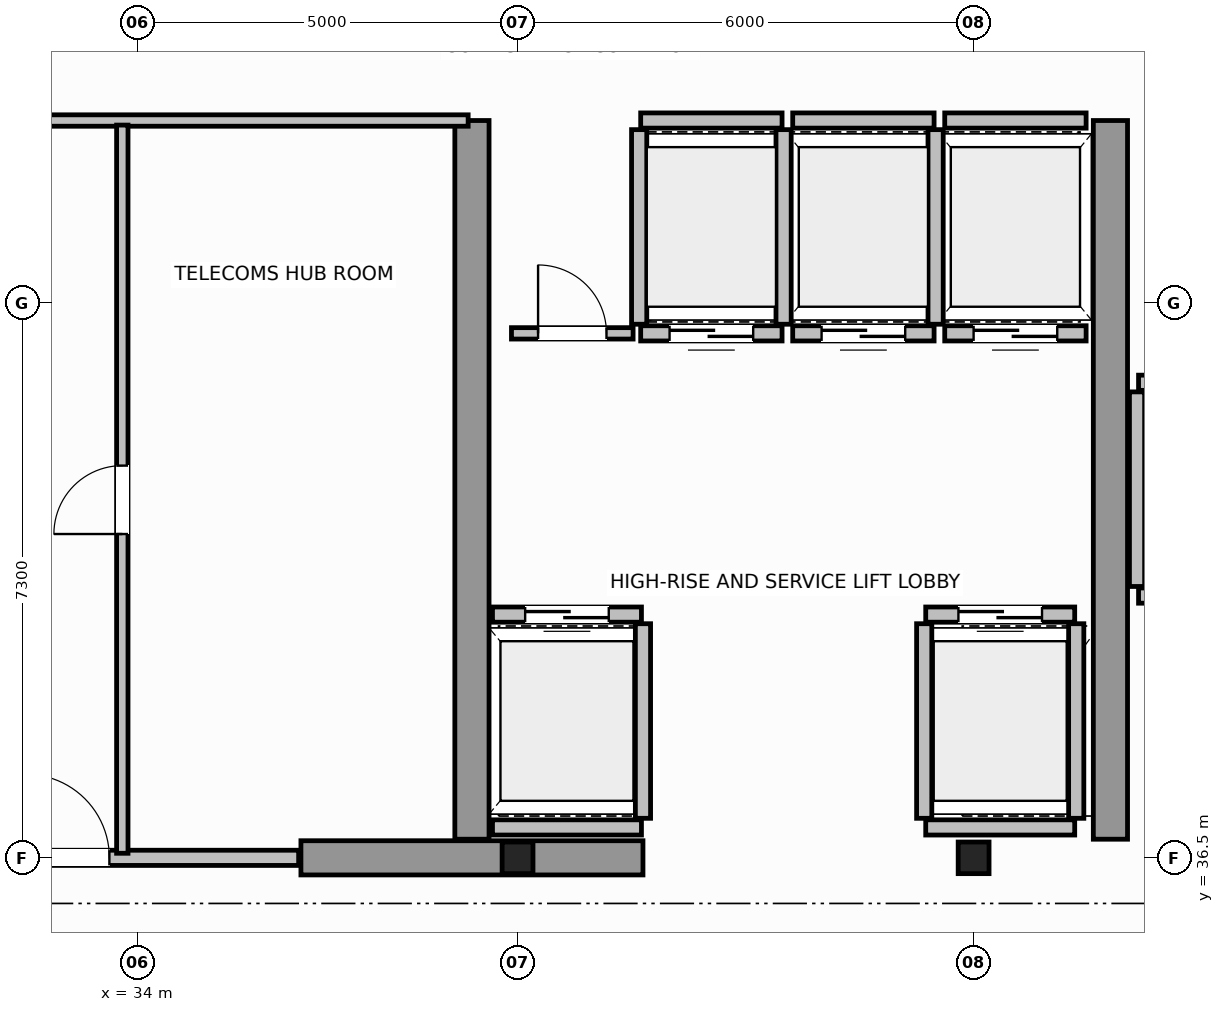
"""IFC4 building model, lengths in metres.
Left out: names, types, materials, properties, quantities, classifications, styles, units other than length and angle.
Written with IfcOpenShell. Run it as: python <this file> out.ifc"""

import sys

from ifc_helpers import new_model, si_unit, direction, frame, frame_2d, origin, origin_2d, place, context, subcontext, project, spatial, rectangle, i_section, extrude, source, transform, mapped, element, fill, save


model = new_model("IFC4")
c1 = context("Model", 3, precision=1e-05, world=origin(), true_north=direction((0.0, 1.0)))
c2 = subcontext(c1, "Body", "Model", "MODEL_VIEW")
j1 = project(units=[si_unit("LENGTHUNIT", "METRE"), si_unit("PLANEANGLEUNIT", "RADIAN")], contexts=[c1])
p1 = place(None, origin())
s1 = spatial("IfcSite", under=j1, at=p1, CompositionType="ELEMENT")
p2 = place(p1, origin())
s2 = spatial("IfcBuilding", under=s1, at=p2, CompositionType="ELEMENT")
p3 = place(p2, frame((0.0, 0.0, 272.6)))
s3 = spatial("IfcBuildingStorey", under=s2, at=p3, CompositionType="ELEMENT", Elevation=272.6)
m1 = source(origin(), c2, "Body", "SweptSolid", [
    extrude(i_section(OverallWidth=0.406, OverallDepth=0.416, WebThickness=0.03, FlangeThickness=0.042, FilletRadius=0.015, at=origin_2d()), origin(), (0.0, 0.0, 1.0), 3.8),
])
for number, where, z_axis, x_axis in (
    (1, (39.0, 36.5, 0.0), (0.0, 0.0, 1.0), (1.0, 0.0, 0.0)),
    (2, (45.0, 36.5, 0.0), (0.0, 0.0, 1.0), (1.0, 0.0, 0.0)),
):
    element("IfcColumn", number, at=place(p3, frame(where, z_axis=z_axis, x_axis=x_axis)), inside=s3, PredefinedType="COLUMN", context=c2, shape_type="MappedRepresentation", body=[
        mapped(m1, transform((0.0, 0.0, 0.0), scale=1.0)),
    ])
p4 = place(p3, frame((36.15, 36.5, 0.0), z_axis=(0.0, 0.0, 1.0), x_axis=(1.0, 0.0, 0.0)))
e3 = element("IfcWall", 3, at=p4, inside=s3, PredefinedType="SHEAR", context=c2, shape_type="SweptSolid", body=[
    extrude(rectangle(XDim=4.5, YDim=0.45, at=frame_2d((2.25, 0.0))), origin(), (0.0, 0.0, 1.0), 3.8),
])
for number, where, z_axis, x_axis in (
    (4, (38.4, 36.745, 0.0), (0.0, 0.0, 1.0), (0.0, 1.0, 0.0)),
    (5, (46.8, 36.745, 0.0), (0.0, 0.0, 1.0), (0.0, 1.0, 0.0)),
):
    element("IfcWall", number, at=place(p3, frame(where, z_axis=z_axis, x_axis=x_axis)), inside=s3, PredefinedType="SHEAR", context=c2, shape_type="SweptSolid", body=[
        extrude(rectangle(XDim=9.455, YDim=0.45, at=frame_2d((4.728, 0.0))), origin(), (0.0, 0.0, 1.0), 3.8),
    ])
p5 = place(p3, frame((38.67, 39.7, 0.0), z_axis=(0.0, 0.0, 1.0), x_axis=(1.0, 0.0, 0.0)))
e6 = element("IfcWall", 6, at=p5, inside=s3, PredefinedType="SOLIDWALL", context=c2, shape_type="SweptSolid", body=[
    extrude(rectangle(XDim=1.96, YDim=0.2, at=frame_2d((0.98, 0.0))), origin(), (0.0, 0.0, 1.0), 3.58),
])
p6 = place(p5, frame((0.43, 0.0, 0.0)))
e7 = element("IfcOpeningElement", 7, at=p6, cuts=e6, PredefinedType="OPENING", context=c2, shape_type="SweptSolid", body=[
    extrude(rectangle(XDim=1.1, YDim=2.15, at=frame_2d((0.55, 1.075))), frame((0.0, 0.11, 0.0), z_axis=(0.0, -1.0, 0.0), x_axis=(1.0, 0.0, 0.0)), (0.0, 0.0, 1.0), 0.22),
])
p7 = place(p3, frame((38.67, 36.9, 0.0), z_axis=(0.0, 0.0, 1.0), x_axis=(1.0, 0.0, 0.0)))
e8 = element("IfcWall", 8, at=p7, inside=s3, PredefinedType="SOLIDWALL", context=c2, shape_type="SweptSolid", body=[
    extrude(rectangle(XDim=1.96, YDim=0.2, at=frame_2d((0.98, 0.0))), origin(), (0.0, 0.0, 1.0), 3.58),
])
p8 = place(p3, frame((40.65, 37.02, 0.0), z_axis=(0.0, 0.0, 1.0), x_axis=(0.0, 1.0, 0.0)))
e9 = element("IfcWall", 9, at=p8, inside=s3, PredefinedType="SOLIDWALL", context=c2, shape_type="SweptSolid", body=[
    extrude(rectangle(XDim=2.56, YDim=0.2, at=frame_2d((1.28, 0.0))), origin(), (0.0, 0.0, 1.0), 3.58),
])
p9 = place(p3, frame((44.37, 39.7, 0.0), z_axis=(0.0, 0.0, 1.0), x_axis=(1.0, 0.0, 0.0)))
e10 = element("IfcWall", 10, at=p9, inside=s3, PredefinedType="SOLIDWALL", context=c2, shape_type="SweptSolid", body=[
    extrude(rectangle(XDim=1.96, YDim=0.2, at=frame_2d((0.98, 0.0))), origin(), (0.0, 0.0, 1.0), 3.58),
])
p10 = place(p9, frame((0.43, 0.0, 0.0)))
e11 = element("IfcOpeningElement", 11, at=p10, cuts=e10, PredefinedType="OPENING", context=c2, shape_type="SweptSolid", body=[
    extrude(rectangle(XDim=1.1, YDim=2.15, at=frame_2d((0.55, 1.075))), frame((0.0, 0.11, 0.0), z_axis=(0.0, -1.0, 0.0), x_axis=(1.0, 0.0, 0.0)), (0.0, 0.0, 1.0), 0.22),
])
p11 = place(p3, frame((44.37, 36.9, 0.0), z_axis=(0.0, 0.0, 1.0), x_axis=(1.0, 0.0, 0.0)))
e12 = element("IfcWall", 12, at=p11, inside=s3, PredefinedType="SOLIDWALL", context=c2, shape_type="SweptSolid", body=[
    extrude(rectangle(XDim=1.96, YDim=0.2, at=frame_2d((0.98, 0.0))), origin(), (0.0, 0.0, 1.0), 2.57),
])
for number, where, z_axis, x_axis in (
    (13, (44.35, 37.02, 0.0), (0.0, 0.0, 1.0), (0.0, 1.0, 0.0)),
    (14, (46.35, 37.02, 0.0), (0.0, 0.0, 1.0), (0.0, 1.0, 0.0)),
):
    element("IfcWall", number, at=place(p3, frame(where, z_axis=z_axis, x_axis=x_axis)), inside=s3, PredefinedType="SOLIDWALL", context=c2, shape_type="SweptSolid", body=[
        extrude(rectangle(XDim=2.56, YDim=0.2, at=frame_2d((1.28, 0.0))), origin(), (0.0, 0.0, 1.0), 3.58),
    ])
p12 = place(p3, frame((40.62, 43.4, 0.0), z_axis=(0.0, 0.0, 1.0), x_axis=(1.0, 0.0, 0.0)))
e15 = element("IfcWall", 15, at=p12, inside=s3, PredefinedType="SOLIDWALL", context=c2, shape_type="SweptSolid", body=[
    extrude(rectangle(XDim=1.86, YDim=0.2, at=frame_2d((0.93, 0.0))), origin(), (0.0, 0.0, 1.0), 3.58),
])
p13 = place(p12, frame((0.38, 0.0, 0.0)))
e16 = element("IfcOpeningElement", 16, at=p13, cuts=e15, PredefinedType="OPENING", context=c2, shape_type="SweptSolid", body=[
    extrude(rectangle(XDim=1.1, YDim=2.15, at=frame_2d((0.55, 1.075))), frame((0.0, 0.11, 0.0), z_axis=(0.0, -1.0, 0.0), x_axis=(1.0, 0.0, 0.0)), (0.0, 0.0, 1.0), 0.22),
])
p14 = place(p3, frame((40.62, 46.2, 0.0), z_axis=(0.0, 0.0, 1.0), x_axis=(1.0, 0.0, 0.0)))
e17 = element("IfcWall", 17, at=p14, inside=s3, PredefinedType="SOLIDWALL", context=c2, shape_type="SweptSolid", body=[
    extrude(rectangle(XDim=1.86, YDim=0.2, at=frame_2d((0.93, 0.0))), origin(), (0.0, 0.0, 1.0), 3.58),
])
for number, where, z_axis, x_axis in (
    (18, (40.6, 43.52, 0.0), (0.0, 0.0, 1.0), (0.0, 1.0, 0.0)),
    (19, (42.5, 43.52, 0.0), (0.0, 0.0, 1.0), (0.0, 1.0, 0.0)),
):
    element("IfcWall", number, at=place(p3, frame(where, z_axis=z_axis, x_axis=x_axis)), inside=s3, PredefinedType="SOLIDWALL", context=c2, shape_type="SweptSolid", body=[
        extrude(rectangle(XDim=2.56, YDim=0.2, at=frame_2d((1.28, 0.0))), origin(), (0.0, 0.0, 1.0), 3.58),
    ])
p15 = place(p3, frame((42.62, 43.4, 0.0), z_axis=(0.0, 0.0, 1.0), x_axis=(1.0, 0.0, 0.0)))
e20 = element("IfcWall", 20, at=p15, inside=s3, PredefinedType="SOLIDWALL", context=c2, shape_type="SweptSolid", body=[
    extrude(rectangle(XDim=1.86, YDim=0.2, at=frame_2d((0.93, 0.0))), origin(), (0.0, 0.0, 1.0), 3.58),
])
p16 = place(p15, frame((0.38, 0.0, 0.0)))
e21 = element("IfcOpeningElement", 21, at=p16, cuts=e20, PredefinedType="OPENING", context=c2, shape_type="SweptSolid", body=[
    extrude(rectangle(XDim=1.1, YDim=2.15, at=frame_2d((0.55, 1.075))), frame((0.0, 0.11, 0.0), z_axis=(0.0, -1.0, 0.0), x_axis=(1.0, 0.0, 0.0)), (0.0, 0.0, 1.0), 0.22),
])
p17 = place(p3, frame((42.62, 46.2, 0.0), z_axis=(0.0, 0.0, 1.0), x_axis=(1.0, 0.0, 0.0)))
e22 = element("IfcWall", 22, at=p17, inside=s3, PredefinedType="SOLIDWALL", context=c2, shape_type="SweptSolid", body=[
    extrude(rectangle(XDim=1.86, YDim=0.2, at=frame_2d((0.93, 0.0))), origin(), (0.0, 0.0, 1.0), 3.58),
])
p18 = place(p3, frame((44.5, 43.52, 0.0), z_axis=(0.0, 0.0, 1.0), x_axis=(0.0, 1.0, 0.0)))
e23 = element("IfcWall", 23, at=p18, inside=s3, PredefinedType="SOLIDWALL", context=c2, shape_type="SweptSolid", body=[
    extrude(rectangle(XDim=2.56, YDim=0.2, at=frame_2d((1.28, 0.0))), origin(), (0.0, 0.0, 1.0), 3.58),
])
p19 = place(p3, frame((44.62, 43.4, 0.0), z_axis=(0.0, 0.0, 1.0), x_axis=(1.0, 0.0, 0.0)))
e24 = element("IfcWall", 24, at=p19, inside=s3, PredefinedType="SOLIDWALL", context=c2, shape_type="SweptSolid", body=[
    extrude(rectangle(XDim=1.86, YDim=0.2, at=frame_2d((0.93, 0.0))), origin(), (0.0, 0.0, 1.0), 3.58),
])
p20 = place(p19, frame((0.38, 0.0, 0.0)))
e25 = element("IfcOpeningElement", 25, at=p20, cuts=e24, PredefinedType="OPENING", context=c2, shape_type="SweptSolid", body=[
    extrude(rectangle(XDim=1.1, YDim=2.15, at=frame_2d((0.55, 1.075))), frame((0.0, 0.11, 0.0), z_axis=(0.0, -1.0, 0.0), x_axis=(1.0, 0.0, 0.0)), (0.0, 0.0, 1.0), 0.22),
])
p21 = place(p3, frame((44.62, 46.2, 0.0), z_axis=(0.0, 0.0, 1.0), x_axis=(1.0, 0.0, 0.0)))
e26 = element("IfcWall", 26, at=p21, inside=s3, PredefinedType="SOLIDWALL", context=c2, shape_type="SweptSolid", body=[
    extrude(rectangle(XDim=1.86, YDim=0.2, at=frame_2d((0.93, 0.0))), origin(), (0.0, 0.0, 1.0), 3.58),
])
p22 = place(p3, frame((47.17, 39.95, 0.0), z_axis=(0.0, 0.0, 1.0), x_axis=(1.0, 0.0, 0.0)))
e27 = element("IfcWall", 27, at=p22, inside=s3, PredefinedType="SOLIDWALL", context=c2, shape_type="SweptSolid", body=[
    extrude(rectangle(XDim=2.16, YDim=0.2, at=frame_2d((1.08, 0.0))), origin(), (0.0, 0.0, 1.0), 3.58),
])
p23 = place(p22, frame((0.53, 0.0, 0.0)))
e28 = element("IfcOpeningElement", 28, at=p23, cuts=e27, PredefinedType="OPENING", context=c2, shape_type="SweptSolid", body=[
    extrude(rectangle(XDim=1.1, YDim=2.15, at=frame_2d((0.55, 1.075))), frame((0.0, 0.11, 0.0), z_axis=(0.0, -1.0, 0.0), x_axis=(1.0, 0.0, 0.0)), (0.0, 0.0, 1.0), 0.22),
])
p24 = place(p3, frame((47.17, 42.75, 0.0), z_axis=(0.0, 0.0, 1.0), x_axis=(1.0, 0.0, 0.0)))
e29 = element("IfcWall", 29, at=p24, inside=s3, PredefinedType="SOLIDWALL", context=c2, shape_type="SweptSolid", body=[
    extrude(rectangle(XDim=2.16, YDim=0.2, at=frame_2d((1.08, 0.0))), origin(), (0.0, 0.0, 1.0), 3.58),
])
p25 = place(p3, frame((47.15, 40.07, 0.0), z_axis=(0.0, 0.0, 1.0), x_axis=(0.0, 1.0, 0.0)))
e30 = element("IfcWall", 30, at=p25, inside=s3, PredefinedType="SOLIDWALL", context=c2, shape_type="SweptSolid", body=[
    extrude(rectangle(XDim=2.56, YDim=0.2, at=frame_2d((1.28, 0.0))), origin(), (0.0, 0.0, 1.0), 3.58),
])
p26 = place(p3, frame((32.08, 36.5, 0.0), z_axis=(0.0, 0.0, 1.0), x_axis=(1.0, 0.0, 0.0)))
e31 = element("IfcWall", 31, at=p26, inside=s3, PredefinedType="SOLIDWALL", context=c2, shape_type="SweptSolid", body=[
    extrude(rectangle(XDim=4.04, YDim=0.2, at=frame_2d((2.02, 0.0))), origin(), (0.0, 0.0, 1.0), 3.02),
])
p27 = place(p26, frame((0.45, 0.0, 0.0)))
e32 = element("IfcOpeningElement", 32, at=p27, cuts=e31, PredefinedType="OPENING", context=c2, shape_type="SweptSolid", body=[
    extrude(rectangle(XDim=1.1, YDim=2.15, at=frame_2d((0.55, 1.075))), frame((0.0, 0.11, 0.0), z_axis=(0.0, -1.0, 0.0), x_axis=(1.0, 0.0, 0.0)), (0.0, 0.0, 1.0), 0.22),
])
p28 = place(p3, frame((29.85, 46.2, 0.0), z_axis=(0.0, 0.0, 1.0), x_axis=(1.0, 0.0, 0.0)))
e33 = element("IfcWall", 33, at=p28, inside=s3, PredefinedType="PARTITIONING", context=c2, shape_type="SweptSolid", body=[
    extrude(rectangle(XDim=8.5, YDim=0.15, at=frame_2d((4.25, 0.0))), origin(), (0.0, 0.0, 1.0), 3.58),
])
p29 = place(p3, frame((33.8, 36.56, 0.0), z_axis=(0.0, 0.0, 1.0), x_axis=(0.0, 1.0, 0.0)))
e34 = element("IfcWall", 34, at=p29, inside=s3, PredefinedType="PARTITIONING", context=c2, shape_type="SweptSolid", body=[
    extrude(rectangle(XDim=9.58, YDim=0.15, at=frame_2d((4.79, 0.0))), origin(), (0.0, 0.0, 1.0), 3.58),
])
p30 = place(p29, frame((4.2, 0.0, 0.0)))
e35 = element("IfcOpeningElement", 35, at=p30, cuts=e34, PredefinedType="OPENING", context=c2, shape_type="SweptSolid", body=[
    extrude(rectangle(XDim=0.9, YDim=2.1, at=frame_2d((0.45, 1.05))), frame((0.0, 0.085, 0.0), z_axis=(0.0, -1.0, 0.0), x_axis=(1.0, 0.0, 0.0)), (0.0, 0.0, 1.0), 0.17),
])
p31 = place(p3, frame((38.92, 43.4, 0.0), z_axis=(0.0, 0.0, 1.0), x_axis=(1.0, 0.0, 0.0)))
e36 = element("IfcWall", 36, at=p31, inside=s3, PredefinedType="PARTITIONING", context=c2, shape_type="SweptSolid", body=[
    extrude(rectangle(XDim=1.6, YDim=0.15, at=frame_2d((0.8, 0.0))), origin(), (0.0, 0.0, 1.0), 3.58),
])
p32 = place(p31, frame((0.35, 0.0, 0.0)))
e37 = element("IfcOpeningElement", 37, at=p32, cuts=e36, PredefinedType="OPENING", context=c2, shape_type="SweptSolid", body=[
    extrude(rectangle(XDim=0.9, YDim=2.1, at=frame_2d((0.45, 1.05))), frame((0.0, 0.085, 0.0), z_axis=(0.0, -1.0, 0.0), x_axis=(1.0, 0.0, 0.0)), (0.0, 0.0, 1.0), 0.17),
])
m2 = source(origin(), c2, "Body", "SweptSolid", [
    extrude(rectangle(XDim=1.1, YDim=2.15, at=frame_2d((0.55, 1.075))), frame((0.0, 0.025, 0.0), z_axis=(0.0, -1.0, 0.0), x_axis=(1.0, 0.0, 0.0)), (0.0, 0.0, 1.0), 0.05),
])
p33 = place(p6, origin())
e38 = element("IfcDoor", 38, at=p33, inside=s3, OperationType="DOUBLE_DOOR_SLIDING", PredefinedType="DOOR", context=c2, shape_type="MappedRepresentation", body=[
    mapped(m2, transform((0.0, 0.0, 0.0), scale=1.0)),
])
fill(e7, e38)
p34 = place(p10, origin())
e39 = element("IfcDoor", 39, at=p34, inside=s3, OperationType="DOUBLE_DOOR_SLIDING", PredefinedType="DOOR", context=c2, shape_type="MappedRepresentation", body=[
    mapped(m2, transform((0.0, 0.0, 0.0), scale=1.0)),
])
fill(e11, e39)
p35 = place(p13, origin())
e40 = element("IfcDoor", 40, at=p35, inside=s3, OperationType="DOUBLE_DOOR_SLIDING", PredefinedType="DOOR", context=c2, shape_type="MappedRepresentation", body=[
    mapped(m2, transform((0.0, 0.0, 0.0), scale=1.0)),
])
fill(e16, e40)
p36 = place(p16, origin())
e41 = element("IfcDoor", 41, at=p36, inside=s3, OperationType="DOUBLE_DOOR_SLIDING", PredefinedType="DOOR", context=c2, shape_type="MappedRepresentation", body=[
    mapped(m2, transform((0.0, 0.0, 0.0), scale=1.0)),
])
fill(e21, e41)
p37 = place(p20, origin())
e42 = element("IfcDoor", 42, at=p37, inside=s3, OperationType="DOUBLE_DOOR_SLIDING", PredefinedType="DOOR", context=c2, shape_type="MappedRepresentation", body=[
    mapped(m2, transform((0.0, 0.0, 0.0), scale=1.0)),
])
fill(e25, e42)
p38 = place(p27, origin())
e43 = element("IfcDoor", 43, at=p38, inside=s3, OperationType="SINGLE_SWING_LEFT", PredefinedType="DOOR", context=c2, shape_type="MappedRepresentation", body=[
    mapped(m2, transform((0.0, 0.0, 0.0), scale=1.0)),
])
fill(e32, e43)
m3 = source(origin(), c2, "Body", "SweptSolid", [
    extrude(rectangle(XDim=0.9, YDim=2.1, at=frame_2d((0.45, 1.05))), frame((0.0, 0.025, 0.0), z_axis=(0.0, -1.0, 0.0), x_axis=(1.0, 0.0, 0.0)), (0.0, 0.0, 1.0), 0.05),
])
p39 = place(p30, origin())
e44 = element("IfcDoor", 44, at=p39, inside=s3, OperationType="SINGLE_SWING_RIGHT", PredefinedType="DOOR", context=c2, shape_type="MappedRepresentation", body=[
    mapped(m3, transform((0.0, 0.0, 0.0), scale=1.0)),
])
fill(e35, e44)
p40 = place(p32, origin())
e45 = element("IfcDoor", 45, at=p40, inside=s3, OperationType="SINGLE_SWING_LEFT", PredefinedType="DOOR", context=c2, shape_type="MappedRepresentation", body=[
    mapped(m3, transform((0.0, 0.0, 0.0), scale=1.0)),
])
fill(e37, e45)
save(model, sys.argv[1])
